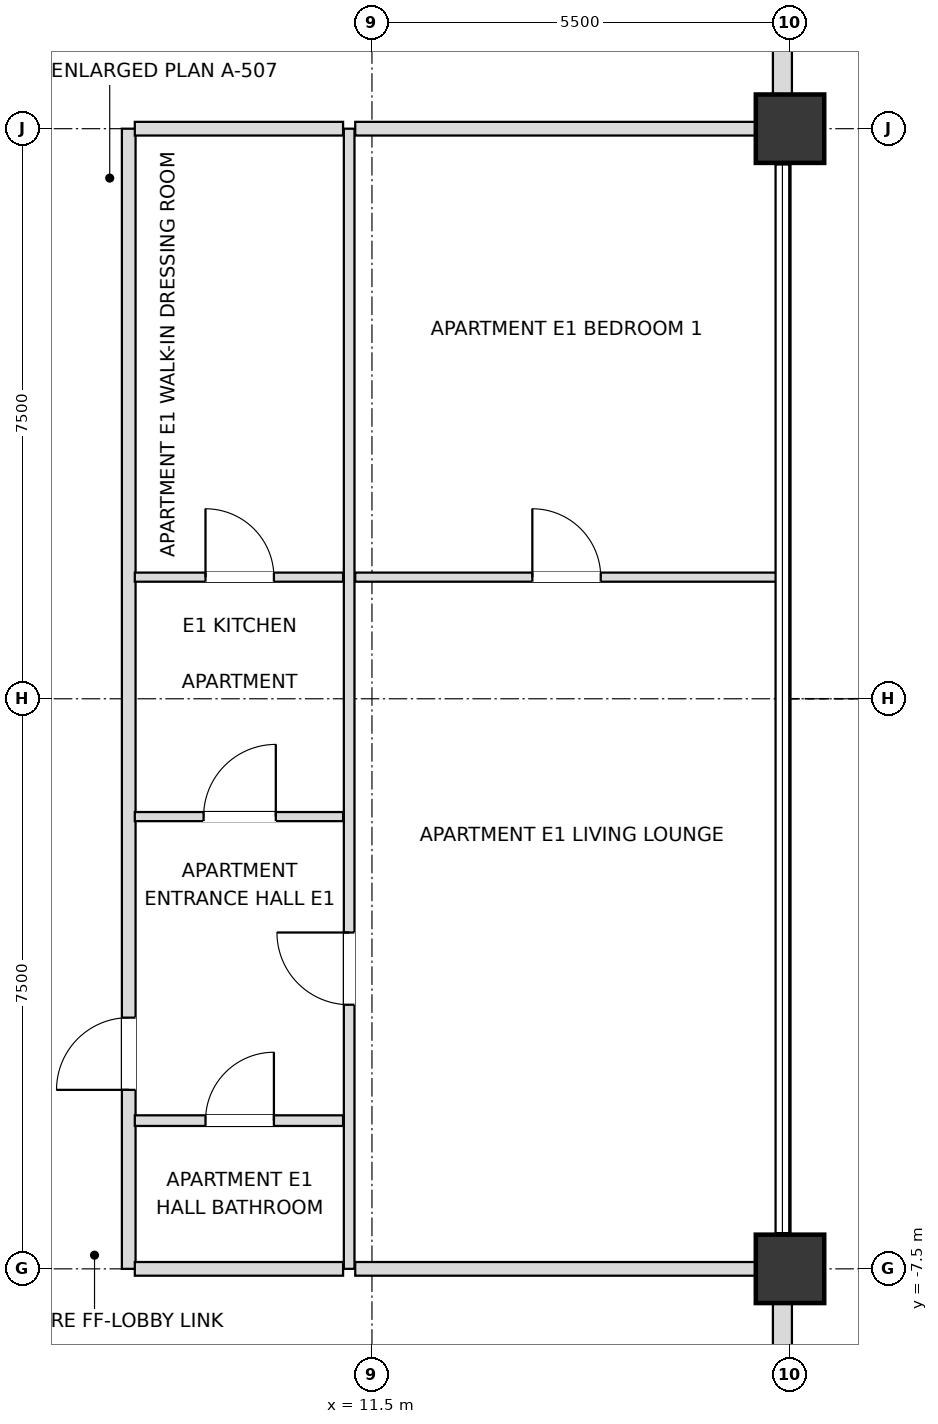
"""IFC4 building model, lengths in metres.
Left out: names, types, materials, properties, quantities, classifications, styles, units other than length and angle.
Written with IfcOpenShell. Run it as: python <this file> out.ifc"""

import sys

from ifc_helpers import new_model, si_unit, direction, frame, frame_2d, origin, origin_2d, place, context, subcontext, project, spatial, rectangle, extrude, element, fill, save


model = new_model("IFC4")
c1 = context("Model", 3, precision=1e-05, world=origin(), true_north=direction((0.0, 1.0)))
c2 = subcontext(c1, "Body", "Model", "MODEL_VIEW")
j1 = project(units=[si_unit("LENGTHUNIT", "METRE"), si_unit("PLANEANGLEUNIT", "RADIAN")], contexts=[c1])
p1 = place(None, origin())
s1 = spatial("IfcSite", under=j1, at=p1, CompositionType="ELEMENT")
p2 = place(p1, origin())
s2 = spatial("IfcBuilding", under=s1, at=p2, CompositionType="ELEMENT")
p3 = place(p2, frame((0.0, 0.0, 240.3)))
s3 = spatial("IfcBuildingStorey", under=s2, at=p3, CompositionType="ELEMENT", Elevation=240.3)
for number, where, z_axis, x_axis in (
    (1, (17.0, -7.5, 0.0), (0.0, 0.0, 1.0), (1.0, 0.0, 0.0)),
    (2, (17.0, 7.5, 0.0), (0.0, 0.0, 1.0), (1.0, 0.0, 0.0)),
):
    element("IfcColumn", number, at=place(p3, frame(where, z_axis=z_axis, x_axis=x_axis)), inside=s3, PredefinedType="USERDEFINED", context=c2, shape_type="SweptSolid", body=[
        extrude(rectangle(XDim=0.9, YDim=0.9, at=origin_2d()), origin(), (0.0, 0.0, 1.0), 3.6),
    ])
p4 = place(p3, frame((16.9, -12.555, 0.0), z_axis=(0.0, 0.0, 1.0), x_axis=(0.0, 1.0, 0.0)))
e3 = element("IfcWall", 3, at=p4, inside=s3, PredefinedType="SOLIDWALL", context=c2, shape_type="SweptSolid", body=[
    extrude(rectangle(XDim=4.61, YDim=0.25, at=frame_2d((2.305, 0.0))), origin(), (0.0, 0.0, 1.0), 2.748),
])
p5 = place(p4, frame((1.405, 0.0, 0.72)))
e4 = element("IfcOpeningElement", 4, at=p5, cuts=e3, PredefinedType="OPENING", context=c2, shape_type="SweptSolid", body=[
    extrude(rectangle(XDim=1.8, YDim=1.68, at=frame_2d((0.9, 0.84))), frame((0.0, 0.135, 0.0), z_axis=(0.0, -1.0, 0.0), x_axis=(1.0, 0.0, 0.0)), (0.0, 0.0, 1.0), 0.27),
])
p6 = place(p3, frame((16.9, 7.945, 0.0), z_axis=(0.0, 0.0, 1.0), x_axis=(0.0, 1.0, 0.0)))
e5 = element("IfcWall", 5, at=p6, inside=s3, PredefinedType="SOLIDWALL", context=c2, shape_type="SweptSolid", body=[
    extrude(rectangle(XDim=4.61, YDim=0.25, at=frame_2d((2.305, 0.0))), origin(), (0.0, 0.0, 1.0), 2.748),
])
p7 = place(p6, frame((1.405, 0.0, 0.72)))
e6 = element("IfcOpeningElement", 6, at=p7, cuts=e5, PredefinedType="OPENING", context=c2, shape_type="SweptSolid", body=[
    extrude(rectangle(XDim=1.8, YDim=1.68, at=frame_2d((0.9, 0.84))), frame((0.0, 0.135, 0.0), z_axis=(0.0, -1.0, 0.0), x_axis=(1.0, 0.0, 0.0)), (0.0, 0.0, 1.0), 0.27),
])
p8 = place(p3, frame((8.3, -7.5, 0.0), z_axis=(0.0, 0.0, 1.0), x_axis=(0.0, 1.0, 0.0)))
e7 = element("IfcWall", 7, at=p8, inside=s3, PredefinedType="PARTITIONING", context=c2, shape_type="SweptSolid", body=[
    extrude(rectangle(XDim=15.0, YDim=0.18, at=frame_2d((7.5, 0.0))), origin(), (0.0, 0.0, 1.0), 3.38),
])
p9 = place(p8, frame((2.355, 0.0, 0.0)))
e8 = element("IfcOpeningElement", 8, at=p9, cuts=e7, PredefinedType="OPENING", context=c2, shape_type="SweptSolid", body=[
    extrude(rectangle(XDim=0.95, YDim=2.15, at=frame_2d((0.475, 1.075))), frame((0.0, 0.1, 0.0), z_axis=(0.0, -1.0, 0.0), x_axis=(1.0, 0.0, 0.0)), (0.0, 0.0, 1.0), 0.2),
])
p10 = place(p3, frame((11.2, -7.5, 0.0), z_axis=(0.0, 0.0, 1.0), x_axis=(0.0, 1.0, 0.0)))
e9 = element("IfcWall", 9, at=p10, inside=s3, PredefinedType="PARTITIONING", context=c2, shape_type="SweptSolid", body=[
    extrude(rectangle(XDim=15.0, YDim=0.14, at=frame_2d((7.5, 0.0))), origin(), (0.0, 0.0, 1.0), 3.38),
])
p11 = place(p10, frame((3.475, 0.0, 0.0)))
e10 = element("IfcOpeningElement", 10, at=p11, cuts=e9, PredefinedType="OPENING", context=c2, shape_type="SweptSolid", body=[
    extrude(rectangle(XDim=0.95, YDim=2.1, at=frame_2d((0.475, 1.05))), frame((0.0, 0.08, 0.0), z_axis=(0.0, -1.0, 0.0), x_axis=(1.0, 0.0, 0.0)), (0.0, 0.0, 1.0), 0.16),
])
p12 = place(p3, frame((8.38, -7.5, 0.0), z_axis=(0.0, 0.0, 1.0), x_axis=(1.0, 0.0, 0.0)))
e11 = element("IfcWall", 11, at=p12, inside=s3, PredefinedType="PARTITIONING", context=c2, shape_type="SweptSolid", body=[
    extrude(rectangle(XDim=2.74, YDim=0.18, at=frame_2d((1.37, 0.0))), origin(), (0.0, 0.0, 1.0), 2.826),
])
p13 = place(p3, frame((11.28, -7.5, 0.0), z_axis=(0.0, 0.0, 1.0), x_axis=(1.0, 0.0, 0.0)))
e12 = element("IfcWall", 12, at=p13, inside=s3, PredefinedType="PARTITIONING", context=c2, shape_type="SweptSolid", body=[
    extrude(rectangle(XDim=5.62, YDim=0.18, at=frame_2d((2.81, 0.0))), origin(), (0.0, 0.0, 1.0), 2.826),
])
p14 = place(p3, frame((8.38, -5.55, 0.0), z_axis=(0.0, 0.0, 1.0), x_axis=(1.0, 0.0, 0.0)))
e13 = element("IfcWall", 13, at=p14, inside=s3, PredefinedType="PARTITIONING", context=c2, shape_type="SweptSolid", body=[
    extrude(rectangle(XDim=2.74, YDim=0.14, at=frame_2d((1.37, 0.0))), origin(), (0.0, 0.0, 1.0), 3.38),
])
p15 = place(p14, frame((0.93, 0.0, 0.0)))
e14 = element("IfcOpeningElement", 14, at=p15, cuts=e13, PredefinedType="OPENING", context=c2, shape_type="SweptSolid", body=[
    extrude(rectangle(XDim=0.9, YDim=2.1, at=frame_2d((0.45, 1.05))), frame((0.0, 0.08, 0.0), z_axis=(0.0, -1.0, 0.0), x_axis=(1.0, 0.0, 0.0)), (0.0, 0.0, 1.0), 0.16),
])
p16 = place(p3, frame((8.38, -1.55, 0.0), z_axis=(0.0, 0.0, 1.0), x_axis=(1.0, 0.0, 0.0)))
e15 = element("IfcWall", 15, at=p16, inside=s3, PredefinedType="PARTITIONING", context=c2, shape_type="SweptSolid", body=[
    extrude(rectangle(XDim=2.74, YDim=0.12, at=frame_2d((1.37, 0.0))), origin(), (0.0, 0.0, 1.0), 3.38),
])
p17 = place(p16, frame((0.905, 0.0, 0.0)))
e16 = element("IfcOpeningElement", 16, at=p17, cuts=e15, PredefinedType="OPENING", context=c2, shape_type="SweptSolid", body=[
    extrude(rectangle(XDim=0.95, YDim=2.1, at=frame_2d((0.475, 1.05))), frame((0.0, 0.07, 0.0), z_axis=(0.0, -1.0, 0.0), x_axis=(1.0, 0.0, 0.0)), (0.0, 0.0, 1.0), 0.14),
])
p18 = place(p3, frame((8.38, 1.6, 0.0), z_axis=(0.0, 0.0, 1.0), x_axis=(1.0, 0.0, 0.0)))
e17 = element("IfcWall", 17, at=p18, inside=s3, PredefinedType="PARTITIONING", context=c2, shape_type="SweptSolid", body=[
    extrude(rectangle(XDim=2.74, YDim=0.12, at=frame_2d((1.37, 0.0))), origin(), (0.0, 0.0, 1.0), 3.38),
])
p19 = place(p18, frame((0.93, 0.0, 0.0)))
e18 = element("IfcOpeningElement", 18, at=p19, cuts=e17, PredefinedType="OPENING", context=c2, shape_type="SweptSolid", body=[
    extrude(rectangle(XDim=0.9, YDim=2.1, at=frame_2d((0.45, 1.05))), frame((0.0, 0.07, 0.0), z_axis=(0.0, -1.0, 0.0), x_axis=(1.0, 0.0, 0.0)), (0.0, 0.0, 1.0), 0.14),
])
p20 = place(p3, frame((11.28, 1.6, 0.0), z_axis=(0.0, 0.0, 1.0), x_axis=(1.0, 0.0, 0.0)))
e19 = element("IfcWall", 19, at=p20, inside=s3, PredefinedType="PARTITIONING", context=c2, shape_type="SweptSolid", body=[
    extrude(rectangle(XDim=5.54, YDim=0.12, at=frame_2d((2.77, 0.0))), origin(), (0.0, 0.0, 1.0), 3.018),
])
p21 = place(p20, frame((2.33, 0.0, 0.0)))
e20 = element("IfcOpeningElement", 20, at=p21, cuts=e19, PredefinedType="OPENING", context=c2, shape_type="SweptSolid", body=[
    extrude(rectangle(XDim=0.9, YDim=2.1, at=frame_2d((0.45, 1.05))), frame((0.0, 0.07, 0.0), z_axis=(0.0, -1.0, 0.0), x_axis=(1.0, 0.0, 0.0)), (0.0, 0.0, 1.0), 0.14),
])
p22 = place(p3, frame((8.38, 7.5, 0.0), z_axis=(0.0, 0.0, 1.0), x_axis=(1.0, 0.0, 0.0)))
e21 = element("IfcWall", 21, at=p22, inside=s3, PredefinedType="PARTITIONING", context=c2, shape_type="SweptSolid", body=[
    extrude(rectangle(XDim=2.74, YDim=0.18, at=frame_2d((1.37, 0.0))), origin(), (0.0, 0.0, 1.0), 2.826),
])
p23 = place(p3, frame((11.28, 7.5, 0.0), z_axis=(0.0, 0.0, 1.0), x_axis=(1.0, 0.0, 0.0)))
e22 = element("IfcWall", 22, at=p23, inside=s3, PredefinedType="PARTITIONING", context=c2, shape_type="SweptSolid", body=[
    extrude(rectangle(XDim=5.62, YDim=0.18, at=frame_2d((2.81, 0.0))), origin(), (0.0, 0.0, 1.0), 2.826),
])
p24 = place(p15, origin())
e23 = element("IfcDoor", 23, at=p24, inside=s3, OperationType="SINGLE_SWING_RIGHT", PredefinedType="DOOR", context=c2, shape_type="SweptSolid", body=[
    extrude(rectangle(XDim=0.9, YDim=2.1, at=frame_2d((0.45, 1.05))), frame((0.0, 0.025, 0.0), z_axis=(0.0, -1.0, 0.0), x_axis=(1.0, 0.0, 0.0)), (0.0, 0.0, 1.0), 0.05),
])
fill(e14, e23)
p25 = place(p9, origin())
e24 = element("IfcDoor", 24, at=p25, inside=s3, OperationType="SINGLE_SWING_LEFT", PredefinedType="DOOR", context=c2, shape_type="SweptSolid", body=[
    extrude(rectangle(XDim=0.95, YDim=2.15, at=frame_2d((0.475, 1.075))), frame((0.0, 0.025, 0.0), z_axis=(0.0, -1.0, 0.0), x_axis=(1.0, 0.0, 0.0)), (0.0, 0.0, 1.0), 0.05),
])
fill(e8, e24)
p26 = place(p17, origin())
e25 = element("IfcDoor", 25, at=p26, inside=s3, OperationType="SINGLE_SWING_RIGHT", PredefinedType="DOOR", context=c2, shape_type="SweptSolid", body=[
    extrude(rectangle(XDim=0.95, YDim=2.1, at=frame_2d((0.475, 1.05))), frame((0.0, 0.025, 0.0), z_axis=(0.0, -1.0, 0.0), x_axis=(1.0, 0.0, 0.0)), (0.0, 0.0, 1.0), 0.05),
])
fill(e16, e25)
p27 = place(p19, origin())
e26 = element("IfcDoor", 26, at=p27, inside=s3, OperationType="SINGLE_SWING_LEFT", PredefinedType="DOOR", context=c2, shape_type="SweptSolid", body=[
    extrude(rectangle(XDim=0.9, YDim=2.1, at=frame_2d((0.45, 1.05))), frame((0.0, 0.025, 0.0), z_axis=(0.0, -1.0, 0.0), x_axis=(1.0, 0.0, 0.0)), (0.0, 0.0, 1.0), 0.05),
])
fill(e18, e26)
p28 = place(p11, origin())
e27 = element("IfcDoor", 27, at=p28, inside=s3, OperationType="SINGLE_SWING_RIGHT", PredefinedType="DOOR", context=c2, shape_type="SweptSolid", body=[
    extrude(rectangle(XDim=0.95, YDim=2.1, at=frame_2d((0.475, 1.05))), frame((0.0, 0.025, 0.0), z_axis=(0.0, -1.0, 0.0), x_axis=(1.0, 0.0, 0.0)), (0.0, 0.0, 1.0), 0.05),
])
fill(e10, e27)
p29 = place(p21, origin())
e28 = element("IfcDoor", 28, at=p29, inside=s3, OperationType="SINGLE_SWING_LEFT", PredefinedType="DOOR", context=c2, shape_type="SweptSolid", body=[
    extrude(rectangle(XDim=0.9, YDim=2.1, at=frame_2d((0.45, 1.05))), frame((0.0, 0.025, 0.0), z_axis=(0.0, -1.0, 0.0), x_axis=(1.0, 0.0, 0.0)), (0.0, 0.0, 1.0), 0.05),
])
fill(e20, e28)
save(model, sys.argv[1])
